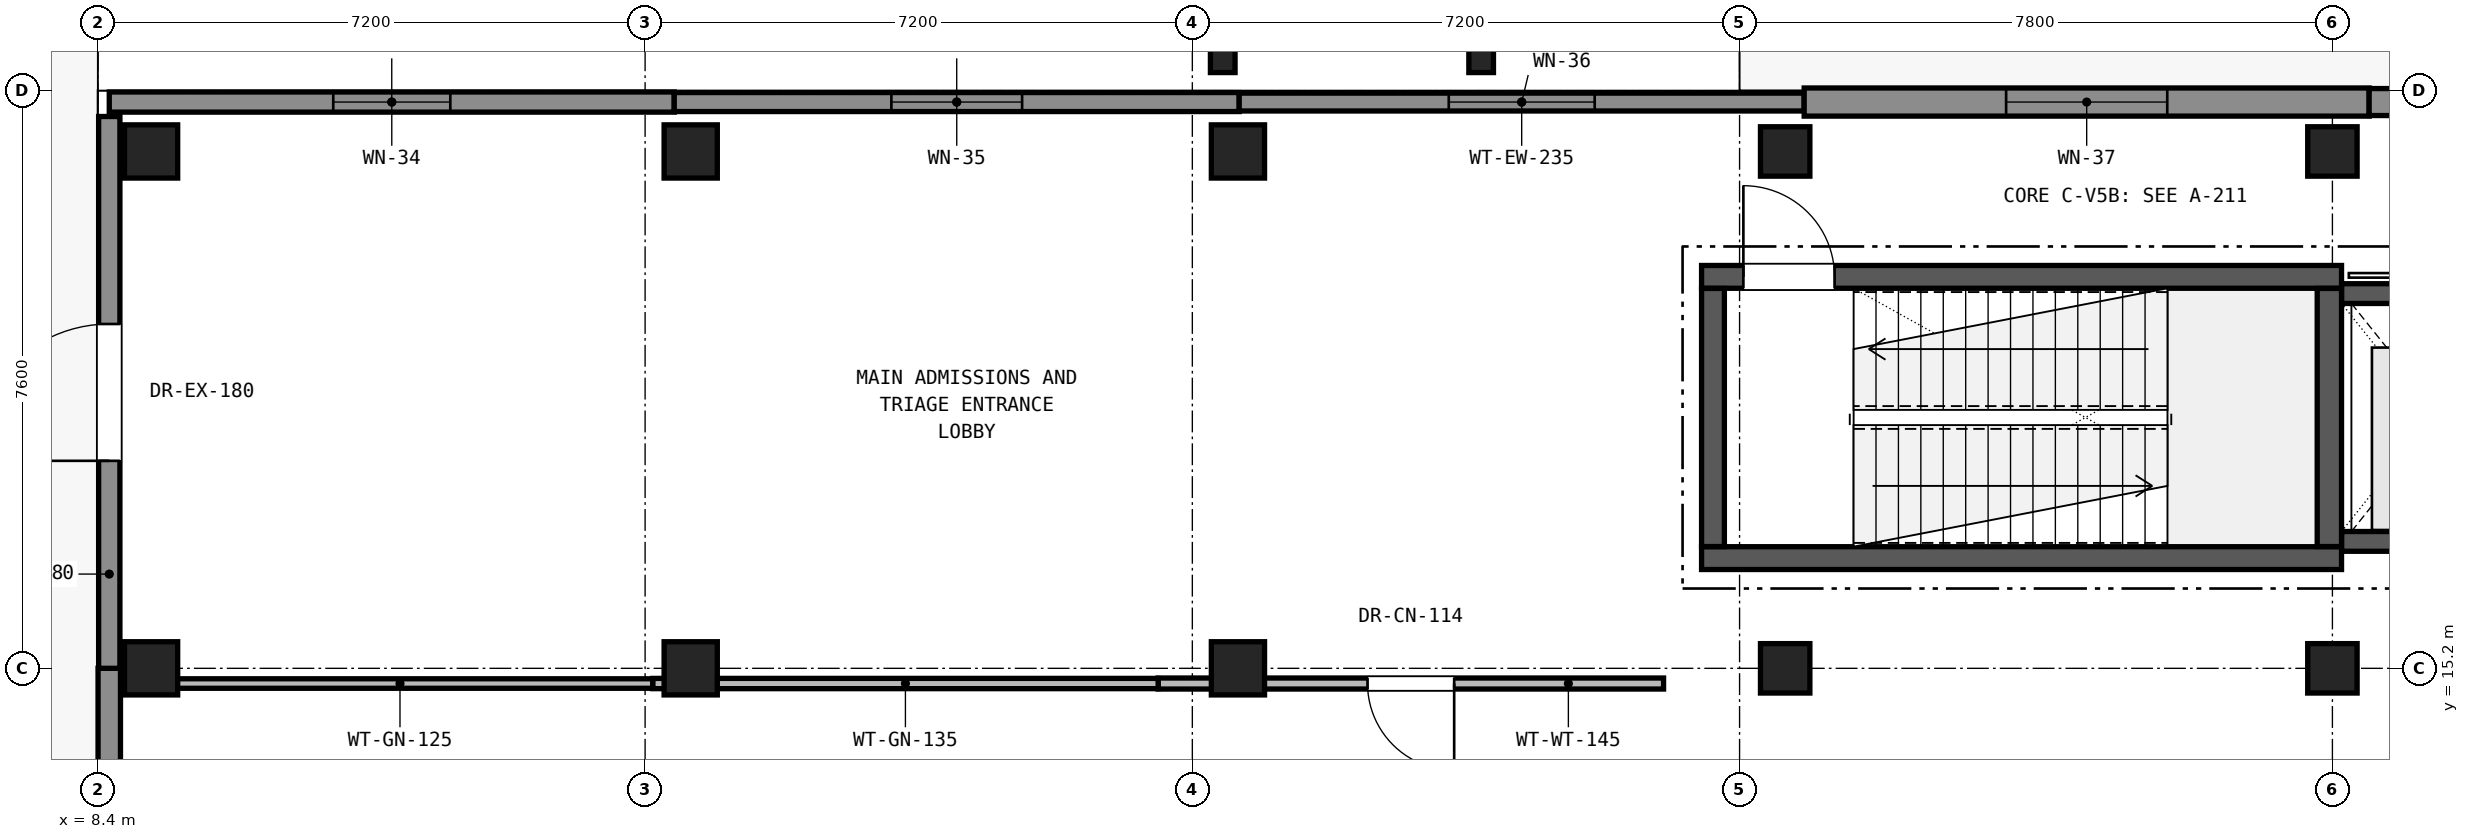
"""IFC4 building model, lengths in metres.
Left out: names, types, materials, properties, quantities, classifications, styles, units other than length and angle.
Written with IfcOpenShell. Run it as: python <this file> out.ifc"""

import sys

from ifc_helpers import new_model, si_unit, direction, frame, frame_2d, origin, origin_2d, place, context, subcontext, project, spatial, rectangle, hollow_circle, extrude, element, fill, save


model = new_model("IFC4")
c1 = context("Model", 3, precision=1e-05, world=origin(), true_north=direction((0.0, 1.0)))
c2 = subcontext(c1, "Body", "Model", "MODEL_VIEW")
j1 = project(units=[si_unit("LENGTHUNIT", "METRE"), si_unit("PLANEANGLEUNIT", "RADIAN")], contexts=[c1])
p1 = place(None, origin())
s1 = spatial("IfcSite", under=j1, at=p1, CompositionType="ELEMENT")
p2 = place(p1, origin())
s2 = spatial("IfcBuilding", under=s1, at=p2, CompositionType="ELEMENT")
p3 = place(p2, origin())
s3 = spatial("IfcBuildingStorey", under=s2, at=p3, CompositionType="ELEMENT", Elevation=0.0)
for number, where, z_axis, x_axis in (
    (1, (9.1, 15.2, 0.0), (0.0, 0.0, 1.0), (1.0, 0.0, 0.0)),
    (2, (9.1, 22.0, 0.0), (0.0, 0.0, 1.0), (1.0, 0.0, 0.0)),
    (3, (16.2, 15.2, 0.0), (0.0, 0.0, 1.0), (1.0, 0.0, 0.0)),
    (4, (16.2, 22.0, 0.0), (0.0, 0.0, 1.0), (1.0, 0.0, 0.0)),
    (5, (23.4, 15.2, 0.0), (0.0, 0.0, 1.0), (1.0, 0.0, 0.0)),
    (6, (23.4, 22.0, 0.0), (0.0, 0.0, 1.0), (1.0, 0.0, 0.0)),
):
    element("IfcColumn", number, at=place(p3, frame(where, z_axis=z_axis, x_axis=x_axis)), inside=s3, PredefinedType="COLUMN", context=c2, shape_type="SweptSolid", body=[
        extrude(rectangle(XDim=0.7, YDim=0.7, at=origin_2d()), origin(), (0.0, 0.0, 1.0), 5.1),
    ])
for number, where, z_axis, x_axis in (
    (7, (30.6, 15.2, 0.0), (0.0, 0.0, 1.0), (1.0, 0.0, 0.0)),
    (8, (30.6, 22.0, 0.0), (0.0, 0.0, 1.0), (1.0, 0.0, 0.0)),
    (9, (37.8, 15.2, 0.0), (0.0, 0.0, 1.0), (1.0, 0.0, 0.0)),
    (10, (37.8, 22.0, 0.0), (0.0, 0.0, 1.0), (1.0, 0.0, 0.0)),
):
    element("IfcColumn", number, at=place(p3, frame(where, z_axis=z_axis, x_axis=x_axis)), inside=s3, PredefinedType="COLUMN", context=c2, shape_type="SweptSolid", body=[
        extrude(rectangle(XDim=0.65, YDim=0.65, at=origin_2d()), origin(), (0.0, 0.0, 1.0), 5.1),
    ])
for number, where, z_axis, x_axis in (
    (11, (23.2, 23.2, 0.0), (0.0, 0.0, 1.0), (1.0, 0.0, 0.0)),
    (12, (26.6, 23.2, 0.0), (0.0, 0.0, 1.0), (1.0, 0.0, 0.0)),
):
    element("IfcColumn", number, at=place(p3, frame(where, z_axis=z_axis, x_axis=x_axis)), inside=s3, PredefinedType="COLUMN", context=c2, shape_type="SweptSolid", body=[
        extrude(hollow_circle(Radius=0.162, WallThickness=0.012, at=origin_2d()), origin(), (0.0, 0.0, 1.0), 5.1),
    ])
p4 = place(p3, frame((8.55, 7.94, 0.0), z_axis=(0.0, 0.0, 1.0), x_axis=(0.0, 1.0, 0.0)))
e13 = element("IfcWall", 13, at=p4, inside=s3, PredefinedType="SOLIDWALL", context=c2, shape_type="SweptSolid", body=[
    extrude(rectangle(XDim=7.26, YDim=0.295, at=frame_2d((3.63, 0.0))), origin(), (0.0, 0.0, 1.0), 4.135),
])
p5 = place(p4, frame((2.655, 0.0, 0.0)))
e14 = element("IfcOpeningElement", 14, at=p5, cuts=e13, PredefinedType="OPENING", context=c2, shape_type="SweptSolid", body=[
    extrude(rectangle(XDim=1.95, YDim=2.4, at=frame_2d((0.975, 1.2))), frame((0.0, 0.157, 0.0), z_axis=(0.0, -1.0, 0.0), x_axis=(1.0, 0.0, 0.0)), (0.0, 0.0, 1.0), 0.315),
])
p6 = place(p3, frame((8.55, 15.2, 0.0), z_axis=(0.0, 0.0, 1.0), x_axis=(0.0, 1.0, 0.0)))
e15 = element("IfcWall", 15, at=p6, inside=s3, PredefinedType="SOLIDWALL", context=c2, shape_type="SweptSolid", body=[
    extrude(rectangle(XDim=7.26, YDim=0.28, at=frame_2d((3.63, 0.0))), origin(), (0.0, 0.0, 1.0), 4.085),
])
p7 = place(p6, frame((2.73, 0.0, 0.0)))
e16 = element("IfcOpeningElement", 16, at=p7, cuts=e15, PredefinedType="OPENING", context=c2, shape_type="SweptSolid", body=[
    extrude(rectangle(XDim=1.8, YDim=2.35, at=frame_2d((0.9, 1.175))), frame((0.0, 0.15, 0.0), z_axis=(0.0, -1.0, 0.0), x_axis=(1.0, 0.0, 0.0)), (0.0, 0.0, 1.0), 0.3),
])
p8 = place(p3, frame((8.55, 22.65, 0.0), z_axis=(0.0, 0.0, 1.0), x_axis=(1.0, 0.0, 0.0)))
e17 = element("IfcWall", 17, at=p8, inside=s3, PredefinedType="SOLIDWALL", context=c2, shape_type="SweptSolid", body=[
    extrude(rectangle(XDim=7.433, YDim=0.265, at=frame_2d((3.717, 0.0))), origin(), (0.0, 0.0, 1.0), 4.785),
])
p9 = place(p8, frame((2.947, 0.0, 0.9)))
e18 = element("IfcOpeningElement", 18, at=p9, cuts=e17, PredefinedType="OPENING", context=c2, shape_type="SweptSolid", body=[
    extrude(rectangle(XDim=1.54, YDim=1.62, at=frame_2d((0.77, 0.81))), frame((0.0, 0.142, 0.0), z_axis=(0.0, -1.0, 0.0), x_axis=(1.0, 0.0, 0.0)), (0.0, 0.0, 1.0), 0.285),
])
p10 = place(p3, frame((15.983, 22.65, 0.0), z_axis=(0.0, 0.0, 1.0), x_axis=(1.0, 0.0, 0.0)))
e19 = element("IfcWall", 19, at=p10, inside=s3, PredefinedType="SOLIDWALL", context=c2, shape_type="SweptSolid", body=[
    extrude(rectangle(XDim=7.433, YDim=0.25, at=frame_2d((3.717, 0.0))), origin(), (0.0, 0.0, 1.0), 4.785),
])
p11 = place(p10, frame((2.857, 0.0, 0.9)))
e20 = element("IfcOpeningElement", 20, at=p11, cuts=e19, PredefinedType="OPENING", context=c2, shape_type="SweptSolid", body=[
    extrude(rectangle(XDim=1.72, YDim=1.62, at=frame_2d((0.86, 0.81))), frame((0.0, 0.135, 0.0), z_axis=(0.0, -1.0, 0.0), x_axis=(1.0, 0.0, 0.0)), (0.0, 0.0, 1.0), 0.27),
])
p12 = place(p3, frame((23.417, 22.65, 0.0), z_axis=(0.0, 0.0, 1.0), x_axis=(1.0, 0.0, 0.0)))
e21 = element("IfcWall", 21, at=p12, inside=s3, PredefinedType="SOLIDWALL", context=c2, shape_type="SweptSolid", body=[
    extrude(rectangle(XDim=7.433, YDim=0.235, at=frame_2d((3.717, 0.0))), origin(), (0.0, 0.0, 1.0), 4.785),
])
p13 = place(p12, frame((2.757, 0.0, 0.9)))
e22 = element("IfcOpeningElement", 22, at=p13, cuts=e21, PredefinedType="OPENING", context=c2, shape_type="SweptSolid", body=[
    extrude(rectangle(XDim=1.92, YDim=1.62, at=frame_2d((0.96, 0.81))), frame((0.0, 0.127, 0.0), z_axis=(0.0, -1.0, 0.0), x_axis=(1.0, 0.0, 0.0)), (0.0, 0.0, 1.0), 0.255),
])
p14 = place(p3, frame((30.85, 22.65, 0.0), z_axis=(0.0, 0.0, 1.0), x_axis=(1.0, 0.0, 0.0)))
e23 = element("IfcWall", 23, at=p14, inside=s3, PredefinedType="SOLIDWALL", context=c2, shape_type="SweptSolid", body=[
    extrude(rectangle(XDim=7.433, YDim=0.37, at=frame_2d((3.717, 0.0))), origin(), (0.0, 0.0, 1.0), 4.785),
])
p15 = place(p14, frame((2.657, 0.0, 0.9)))
e24 = element("IfcOpeningElement", 24, at=p15, cuts=e23, PredefinedType="OPENING", context=c2, shape_type="SweptSolid", body=[
    extrude(rectangle(XDim=2.12, YDim=1.62, at=frame_2d((1.06, 0.81))), frame((0.0, 0.195, 0.0), z_axis=(0.0, -1.0, 0.0), x_axis=(1.0, 0.0, 0.0)), (0.0, 0.0, 1.0), 0.39),
])
p16 = place(p3, frame((38.283, 22.65, 0.0), z_axis=(0.0, 0.0, 1.0), x_axis=(1.0, 0.0, 0.0)))
e25 = element("IfcWall", 25, at=p16, inside=s3, PredefinedType="SOLIDWALL", context=c2, shape_type="SweptSolid", body=[
    extrude(rectangle(XDim=7.434, YDim=0.355, at=frame_2d((3.717, 0.0))), origin(), (0.0, 0.0, 1.0), 4.785),
])
p17 = place(p16, frame((2.892, 0.0, 0.0)))
e26 = element("IfcOpeningElement", 26, at=p17, cuts=e25, PredefinedType="OPENING", context=c2, shape_type="SweptSolid", body=[
    extrude(rectangle(XDim=1.65, YDim=2.3, at=frame_2d((0.825, 1.15))), frame((0.0, 0.188, 0.0), z_axis=(0.0, -1.0, 0.0), x_axis=(1.0, 0.0, 0.0)), (0.0, 0.0, 1.0), 0.375),
])
p18 = place(p3, frame((29.5, 16.65, 0.0), z_axis=(0.0, 0.0, 1.0), x_axis=(1.0, 0.0, 0.0)))
e27 = element("IfcWall", 27, at=p18, inside=s3, PredefinedType="SHEAR", context=c2, shape_type="SweptSolid", body=[
    extrude(rectangle(XDim=8.42, YDim=0.3, at=frame_2d((4.21, 0.0))), origin(), (0.0, 0.0, 1.0), 4.785),
])
p19 = place(p3, frame((29.5, 20.35, 0.0), z_axis=(0.0, 0.0, 1.0), x_axis=(1.0, 0.0, 0.0)))
e28 = element("IfcWall", 28, at=p19, inside=s3, PredefinedType="SHEAR", context=c2, shape_type="SweptSolid", body=[
    extrude(rectangle(XDim=8.42, YDim=0.3, at=frame_2d((4.21, 0.0))), origin(), (0.0, 0.0, 1.0), 4.785),
])
p20 = place(p19, frame((0.55, 0.0, 0.0)))
e29 = element("IfcOpeningElement", 29, at=p20, cuts=e28, PredefinedType="OPENING", context=c2, shape_type="SweptSolid", body=[
    extrude(rectangle(XDim=1.2, YDim=2.2, at=frame_2d((0.6, 1.1))), frame((0.0, 0.16, 0.0), z_axis=(0.0, -1.0, 0.0), x_axis=(1.0, 0.0, 0.0)), (0.0, 0.0, 1.0), 0.32),
])
p21 = place(p3, frame((29.65, 16.802, 0.0), z_axis=(0.0, 0.0, 1.0), x_axis=(0.0, 1.0, 0.0)))
e30 = element("IfcWall", 30, at=p21, inside=s3, PredefinedType="SHEAR", context=c2, shape_type="SweptSolid", body=[
    extrude(rectangle(XDim=3.396, YDim=0.3, at=frame_2d((1.698, 0.0))), origin(), (0.0, 0.0, 1.0), 4.785),
])
p22 = place(p3, frame((37.76, 16.802, 0.0), z_axis=(0.0, 0.0, 1.0), x_axis=(0.0, 1.0, 0.0)))
e31 = element("IfcWall", 31, at=p22, inside=s3, PredefinedType="SHEAR", context=c2, shape_type="SweptSolid", body=[
    extrude(rectangle(XDim=3.396, YDim=0.32, at=frame_2d((1.698, 0.0))), origin(), (0.0, 0.0, 1.0), 4.785),
])
p23 = place(p3, frame((37.922, 16.87, 0.0), z_axis=(0.0, 0.0, 1.0), x_axis=(1.0, 0.0, 0.0)))
e32 = element("IfcWall", 32, at=p23, inside=s3, PredefinedType="SHEAR", context=c2, shape_type="SweptSolid", body=[
    extrude(rectangle(XDim=2.658, YDim=0.26, at=frame_2d((1.329, 0.0))), origin(), (0.0, 0.0, 1.0), 4.785),
])
p24 = place(p3, frame((37.922, 20.13, 0.0), z_axis=(0.0, 0.0, 1.0), x_axis=(1.0, 0.0, 0.0)))
e33 = element("IfcWall", 33, at=p24, inside=s3, PredefinedType="SHEAR", context=c2, shape_type="SweptSolid", body=[
    extrude(rectangle(XDim=2.658, YDim=0.26, at=frame_2d((1.329, 0.0))), origin(), (0.0, 0.0, 1.0), 4.785),
])
p25 = place(p24, frame((0.679, 0.0, 0.0)))
e34 = element("IfcOpeningElement", 34, at=p25, cuts=e33, PredefinedType="OPENING", context=c2, shape_type="SweptSolid", body=[
    extrude(rectangle(XDim=1.3, YDim=2.2, at=frame_2d((0.65, 1.1))), frame((0.0, 0.14, 0.0), z_axis=(0.0, -1.0, 0.0), x_axis=(1.0, 0.0, 0.0)), (0.0, 0.0, 1.0), 0.28),
])
p26 = place(p3, frame((29.0, 15.0, 0.0), z_axis=(0.0, 0.0, 1.0), x_axis=(-1.0, 0.0, 0.0)))
e35 = element("IfcWall", 35, at=p26, inside=s3, PredefinedType="PARTITIONING", context=c2, shape_type="SweptSolid", body=[
    extrude(rectangle(XDim=6.65, YDim=0.145, at=frame_2d((3.325, 0.0))), origin(), (0.0, 0.0, 1.0), 3.985),
])
p27 = place(p26, frame((2.755, 0.0, 0.0)))
e36 = element("IfcOpeningElement", 36, at=p27, cuts=e35, PredefinedType="OPENING", context=c2, shape_type="SweptSolid", body=[
    extrude(rectangle(XDim=1.14, YDim=2.2, at=frame_2d((0.57, 1.1))), frame((0.0, 0.083, 0.0), z_axis=(0.0, -1.0, 0.0), x_axis=(1.0, 0.0, 0.0)), (0.0, 0.0, 1.0), 0.165),
])
p28 = place(p3, frame((22.35, 15.0, 0.0), z_axis=(0.0, 0.0, 1.0), x_axis=(-1.0, 0.0, 0.0)))
e37 = element("IfcWall", 37, at=p28, inside=s3, PredefinedType="PARTITIONING", context=c2, shape_type="SweptSolid", body=[
    extrude(rectangle(XDim=6.65, YDim=0.135, at=frame_2d((3.325, 0.0))), origin(), (0.0, 0.0, 1.0), 3.985),
])
p29 = place(p3, frame((15.7, 15.0, 0.0), z_axis=(0.0, 0.0, 1.0), x_axis=(-1.0, 0.0, 0.0)))
e38 = element("IfcWall", 38, at=p29, inside=s3, PredefinedType="PARTITIONING", context=c2, shape_type="SweptSolid", body=[
    extrude(rectangle(XDim=6.65, YDim=0.125, at=frame_2d((3.325, 0.0))), origin(), (0.0, 0.0, 1.0), 4.085),
])
p30 = place(p7, origin())
e39 = element("IfcDoor", 39, at=p30, inside=s3, OperationType="SINGLE_SWING_LEFT", PredefinedType="DOOR", context=c2, shape_type="SweptSolid", body=[
    extrude(rectangle(XDim=1.8, YDim=2.35, at=frame_2d((0.9, 1.175))), frame((0.0, 0.025, 0.0), z_axis=(0.0, -1.0, 0.0), x_axis=(1.0, 0.0, 0.0)), (0.0, 0.0, 1.0), 0.05),
])
fill(e16, e39)
p31 = place(p9, origin())
e40 = element("IfcWindow", 40, at=p31, inside=s3, PartitioningType="SINGLE_PANEL", PredefinedType="WINDOW", context=c2, shape_type="SweptSolid", body=[
    extrude(rectangle(XDim=1.54, YDim=1.62, at=frame_2d((0.77, 0.81))), frame((0.0, 0.03, 0.0), z_axis=(0.0, -1.0, 0.0), x_axis=(1.0, 0.0, 0.0)), (0.0, 0.0, 1.0), 0.06),
])
fill(e18, e40)
p32 = place(p11, origin())
e41 = element("IfcWindow", 41, at=p32, inside=s3, PartitioningType="SINGLE_PANEL", PredefinedType="WINDOW", context=c2, shape_type="SweptSolid", body=[
    extrude(rectangle(XDim=1.72, YDim=1.62, at=frame_2d((0.86, 0.81))), frame((0.0, 0.03, 0.0), z_axis=(0.0, -1.0, 0.0), x_axis=(1.0, 0.0, 0.0)), (0.0, 0.0, 1.0), 0.06),
])
fill(e20, e41)
p33 = place(p13, origin())
e42 = element("IfcWindow", 42, at=p33, inside=s3, PartitioningType="SINGLE_PANEL", PredefinedType="WINDOW", context=c2, shape_type="SweptSolid", body=[
    extrude(rectangle(XDim=1.92, YDim=1.62, at=frame_2d((0.96, 0.81))), frame((0.0, 0.03, 0.0), z_axis=(0.0, -1.0, 0.0), x_axis=(1.0, 0.0, 0.0)), (0.0, 0.0, 1.0), 0.06),
])
fill(e22, e42)
p34 = place(p15, origin())
e43 = element("IfcWindow", 43, at=p34, inside=s3, PartitioningType="SINGLE_PANEL", PredefinedType="WINDOW", context=c2, shape_type="SweptSolid", body=[
    extrude(rectangle(XDim=2.12, YDim=1.62, at=frame_2d((1.06, 0.81))), frame((0.0, 0.03, 0.0), z_axis=(0.0, -1.0, 0.0), x_axis=(1.0, 0.0, 0.0)), (0.0, 0.0, 1.0), 0.06),
])
fill(e24, e43)
p35 = place(p20, origin())
e44 = element("IfcDoor", 44, at=p35, inside=s3, OperationType="SINGLE_SWING_LEFT", PredefinedType="DOOR", context=c2, shape_type="SweptSolid", body=[
    extrude(rectangle(XDim=1.2, YDim=2.2, at=frame_2d((0.6, 1.1))), frame((0.0, 0.025, 0.0), z_axis=(0.0, -1.0, 0.0), x_axis=(1.0, 0.0, 0.0)), (0.0, 0.0, 1.0), 0.05),
])
fill(e29, e44)
p36 = place(p27, origin())
e45 = element("IfcDoor", 45, at=p36, inside=s3, OperationType="SINGLE_SWING_LEFT", PredefinedType="DOOR", context=c2, shape_type="SweptSolid", body=[
    extrude(rectangle(XDim=1.14, YDim=2.2, at=frame_2d((0.57, 1.1))), frame((0.0, 0.025, 0.0), z_axis=(0.0, -1.0, 0.0), x_axis=(1.0, 0.0, 0.0)), (0.0, 0.0, 1.0), 0.05),
])
fill(e36, e45)
save(model, sys.argv[1])
